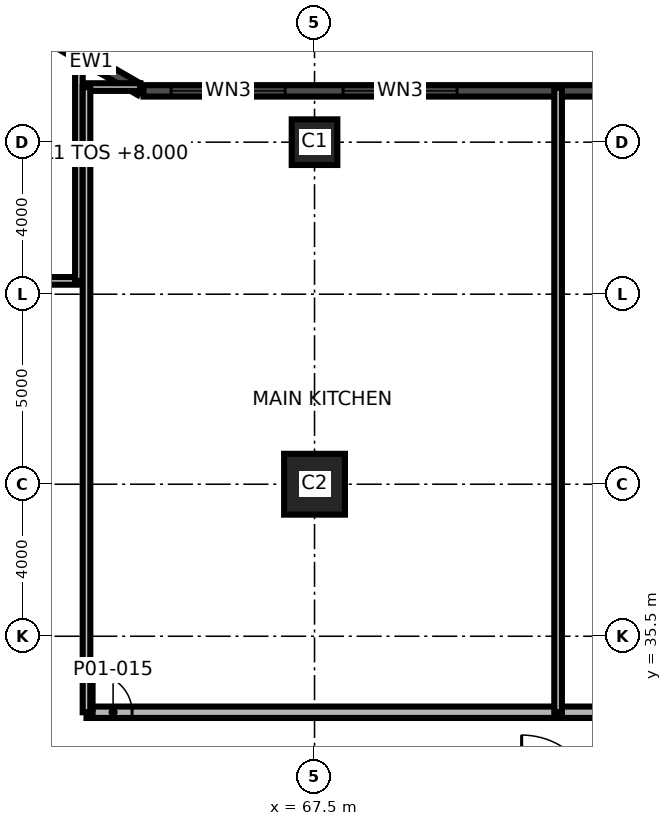
"""IFC4 building model, lengths in metres.
Left out: names, types, materials, properties, quantities, classifications, styles, units other than length and angle.
Written with IfcOpenShell. Run it as: python <this file> out.ifc"""

import sys

from ifc_helpers import new_model, si_unit, direction, frame, frame_2d, origin, origin_2d, place, context, subcontext, project, spatial, rectangle, extrude, element, fill, save


model = new_model("IFC4")
c1 = context("Model", 3, precision=1e-05, world=origin(), true_north=direction((0.0, 1.0)))
c2 = subcontext(c1, "Body", "Model", "MODEL_VIEW")
j1 = project(units=[si_unit("LENGTHUNIT", "METRE"), si_unit("PLANEANGLEUNIT", "RADIAN")], contexts=[c1])
p1 = place(None, origin())
s1 = spatial("IfcSite", under=j1, at=p1, CompositionType="ELEMENT")
p2 = place(p1, origin())
s2 = spatial("IfcBuilding", under=s1, at=p2, CompositionType="ELEMENT")
p3 = place(p2, frame((0.0, 0.0, 8.0)))
s3 = spatial("IfcBuildingStorey", under=s2, at=p3, CompositionType="ELEMENT", Elevation=8.0)
p4 = place(p3, frame((67.5, 39.5, 0.0), z_axis=(0.0, 0.0, 1.0), x_axis=(1.0, 0.0, 0.0)))
e1 = element("IfcColumn", 1, at=p4, inside=s3, PredefinedType="COLUMN", context=c2, shape_type="SweptSolid", body=[
    extrude(rectangle(XDim=1.6, YDim=1.6, at=origin_2d()), origin(), (0.0, 0.0, 1.0), 5.5),
])
p5 = place(p3, frame((67.5, 48.5, 0.0), z_axis=(0.0, 0.0, 1.0), x_axis=(1.0, 0.0, 0.0)))
e2 = element("IfcColumn", 2, at=p5, inside=s3, PredefinedType="COLUMN", context=c2, shape_type="SweptSolid", body=[
    extrude(rectangle(XDim=1.2, YDim=1.2, at=origin_2d()), origin(), (0.0, 0.0, 1.0), 5.5),
])
p6 = place(p3, frame((98.952, 49.85, 0.0), z_axis=(0.0, 0.0, 1.0), x_axis=(-1.0, 0.0, 0.0)))
e3 = element("IfcWall", 3, at=p6, inside=s3, PredefinedType="SOLIDWALL", context=c2, shape_type="SweptSolid", body=[
    extrude(rectangle(XDim=35.952, YDim=0.3, at=frame_2d((17.976, 0.0))), origin(), (0.0, 0.0, 1.0), 5.2),
])
p7 = place(p6, frame((9.702, 0.0, 0.9)))
e4 = element("IfcOpeningElement", 4, at=p7, cuts=e3, PredefinedType="OPENING", context=c2, shape_type="SweptSolid", body=[
    extrude(rectangle(XDim=3.0, YDim=2.4, at=frame_2d((1.5, 1.2))), frame((0.0, 0.16, 0.0), z_axis=(0.0, -1.0, 0.0), x_axis=(1.0, 0.0, 0.0)), (0.0, 0.0, 1.0), 0.32),
])
p8 = place(p6, frame((18.702, 0.0, 0.9)))
e5 = element("IfcOpeningElement", 5, at=p8, cuts=e3, PredefinedType="OPENING", context=c2, shape_type="SweptSolid", body=[
    extrude(rectangle(XDim=3.0, YDim=2.4, at=frame_2d((1.5, 1.2))), frame((0.0, 0.16, 0.0), z_axis=(0.0, -1.0, 0.0), x_axis=(1.0, 0.0, 0.0)), (0.0, 0.0, 1.0), 0.32),
])
p9 = place(p6, frame((27.702, 0.0, 0.9)))
e6 = element("IfcOpeningElement", 6, at=p9, cuts=e3, PredefinedType="OPENING", context=c2, shape_type="SweptSolid", body=[
    extrude(rectangle(XDim=3.0, YDim=2.4, at=frame_2d((1.5, 1.2))), frame((0.0, 0.16, 0.0), z_axis=(0.0, -1.0, 0.0), x_axis=(1.0, 0.0, 0.0)), (0.0, 0.0, 1.0), 0.32),
])
p10 = place(p6, frame((32.226, 0.0, 0.9)))
e7 = element("IfcOpeningElement", 7, at=p10, cuts=e3, PredefinedType="OPENING", context=c2, shape_type="SweptSolid", body=[
    extrude(rectangle(XDim=3.0, YDim=2.4, at=frame_2d((1.5, 1.2))), frame((0.0, 0.16, 0.0), z_axis=(0.0, -1.0, 0.0), x_axis=(1.0, 0.0, 0.0)), (0.0, 0.0, 1.0), 0.32),
])
p11 = place(p3, frame((62.925, 49.87, 0.0), z_axis=(0.0, 0.0, 1.0), x_axis=(-0.866031096941, 0.499990139034, 0.0)))
e8 = element("IfcWall", 8, at=p11, inside=s3, PredefinedType="SOLIDWALL", context=c2, shape_type="SweptSolid", body=[
    extrude(rectangle(XDim=3.0, YDim=0.3, at=frame_2d((1.5, 0.0))), origin(), (0.0, 0.0, 1.0), 5.2),
])
p12 = place(p3, frame((61.5, 33.5, 0.0), z_axis=(0.0, 0.0, 1.0), x_axis=(1.0, 0.0, 0.0)))
e9 = element("IfcWall", 9, at=p12, inside=s3, PredefinedType="SHEAR", context=c2, shape_type="SweptSolid", body=[
    extrude(rectangle(XDim=43.43, YDim=0.3, at=frame_2d((21.715, 0.0))), origin(), (0.0, 0.0, 1.0), 5.2),
])
p13 = place(p12, frame((31.95, 0.0, 0.0)))
e10 = element("IfcOpeningElement", 10, at=p13, cuts=e9, PredefinedType="OPENING", context=c2, shape_type="SweptSolid", body=[
    extrude(rectangle(XDim=1.8, YDim=2.1, at=frame_2d((0.9, 1.05))), frame((0.0, 0.16, 0.0), z_axis=(0.0, -1.0, 0.0), x_axis=(1.0, 0.0, 0.0)), (0.0, 0.0, 1.0), 0.32),
])
p14 = place(p12, frame((0.2, 0.0, 0.0)))
e11 = element("IfcOpeningElement", 11, at=p14, cuts=e9, PredefinedType="OPENING", context=c2, shape_type="SweptSolid", body=[
    extrude(rectangle(XDim=1.0, YDim=2.1, at=frame_2d((0.5, 1.05))), frame((0.0, 0.16, 0.0), z_axis=(0.0, -1.0, 0.0), x_axis=(1.0, 0.0, 0.0)), (0.0, 0.0, 1.0), 0.32),
])
p15 = place(p12, frame((16.325, 0.0, 0.0)))
e12 = element("IfcOpeningElement", 12, at=p15, cuts=e9, PredefinedType="OPENING", context=c2, shape_type="SweptSolid", body=[
    extrude(rectangle(XDim=1.0, YDim=2.1, at=frame_2d((0.5, 1.05))), frame((0.0, 0.16, 0.0), z_axis=(0.0, -1.0, 0.0), x_axis=(1.0, 0.0, 0.0)), (0.0, 0.0, 1.0), 0.32),
])
p16 = place(p12, frame((25.246, 0.0, 0.0)))
e13 = element("IfcOpeningElement", 13, at=p16, cuts=e9, PredefinedType="OPENING", context=c2, shape_type="SweptSolid", body=[
    extrude(rectangle(XDim=1.0, YDim=2.1, at=frame_2d((0.5, 1.05))), frame((0.0, 0.16, 0.0), z_axis=(0.0, -1.0, 0.0), x_axis=(1.0, 0.0, 0.0)), (0.0, 0.0, 1.0), 0.32),
])
p17 = place(p12, frame((37.945, 0.0, 0.0)))
e14 = element("IfcOpeningElement", 14, at=p17, cuts=e9, PredefinedType="OPENING", context=c2, shape_type="SweptSolid", body=[
    extrude(rectangle(XDim=1.0, YDim=2.1, at=frame_2d((0.5, 1.05))), frame((0.0, 0.16, 0.0), z_axis=(0.0, -1.0, 0.0), x_axis=(1.0, 0.0, 0.0)), (0.0, 0.0, 1.0), 0.32),
])
p18 = place(p3, frame((43.3, 44.85, 0.0), z_axis=(0.0, 0.0, 1.0), x_axis=(1.0, 0.0, 0.0)))
e15 = element("IfcWall", 15, at=p18, inside=s3, PredefinedType="PARTITIONING", context=c2, shape_type="SweptSolid", body=[
    extrude(rectangle(XDim=18.2, YDim=0.2, at=frame_2d((9.1, 0.0))), origin(), (0.0, 0.0, 1.0), 5.2),
])
p19 = place(p18, frame((3.377, 0.0, 0.0)))
e16 = element("IfcOpeningElement", 16, at=p19, cuts=e15, PredefinedType="OPENING", context=c2, shape_type="SweptSolid", body=[
    extrude(rectangle(XDim=2.2, YDim=2.4, at=frame_2d((1.1, 1.2))), frame((0.0, 0.11, 0.0), z_axis=(0.0, -1.0, 0.0), x_axis=(1.0, 0.0, 0.0)), (0.0, 0.0, 1.0), 0.22),
])
p20 = place(p3, frame((61.5, 49.95, 0.0), z_axis=(0.0, 0.0, 1.0), x_axis=(1.0, 0.0, 0.0)))
e17 = element("IfcWall", 17, at=p20, inside=s3, PredefinedType="PARTITIONING", context=c2, shape_type="SweptSolid", body=[
    extrude(rectangle(XDim=1.416, YDim=0.2, at=frame_2d((0.708, 0.0))), origin(), (0.0, 0.0, 1.0), 5.2),
])
p21 = place(p3, frame((61.3, 44.85, 0.0), z_axis=(0.0, 0.0, 1.0), x_axis=(0.0, 1.0, 0.0)))
e18 = element("IfcWall", 18, at=p21, inside=s3, PredefinedType="PARTITIONING", context=c2, shape_type="SweptSolid", body=[
    extrude(rectangle(XDim=5.742, YDim=0.2, at=frame_2d((2.871, 0.0))), origin(), (0.0, 0.0, 1.0), 5.2),
])
p22 = place(p3, frame((61.5, 33.5, 0.0), z_axis=(0.0, 0.0, 1.0), x_axis=(0.0, 1.0, 0.0)))
e19 = element("IfcWall", 19, at=p22, inside=s3, PredefinedType="PARTITIONING", context=c2, shape_type="SweptSolid", body=[
    extrude(rectangle(XDim=16.45, YDim=0.2, at=frame_2d((8.225, 0.0))), origin(), (0.0, 0.0, 1.0), 5.2),
])
p23 = place(p3, frame((73.909, 33.5, 0.0), z_axis=(0.0, 0.0, 1.0), x_axis=(0.0, 1.0, 0.0)))
e20 = element("IfcWall", 20, at=p23, inside=s3, PredefinedType="PARTITIONING", context=c2, shape_type="SweptSolid", body=[
    extrude(rectangle(XDim=16.43, YDim=0.2, at=frame_2d((8.215, 0.0))), origin(), (0.0, 0.0, 1.0), 5.2),
])
p24 = place(p9, origin())
e21 = element("IfcWindow", 21, at=p24, inside=s3, PartitioningType="SINGLE_PANEL", PredefinedType="WINDOW", context=c2, shape_type="SweptSolid", body=[
    extrude(rectangle(XDim=3.0, YDim=2.4, at=frame_2d((1.5, 1.2))), frame((0.0, 0.03, 0.0), z_axis=(0.0, -1.0, 0.0), x_axis=(1.0, 0.0, 0.0)), (0.0, 0.0, 1.0), 0.06),
])
fill(e6, e21)
p25 = place(p10, origin())
e22 = element("IfcWindow", 22, at=p25, inside=s3, PartitioningType="SINGLE_PANEL", PredefinedType="WINDOW", context=c2, shape_type="SweptSolid", body=[
    extrude(rectangle(XDim=3.0, YDim=2.4, at=frame_2d((1.5, 1.2))), frame((0.0, 0.03, 0.0), z_axis=(0.0, -1.0, 0.0), x_axis=(1.0, 0.0, 0.0)), (0.0, 0.0, 1.0), 0.06),
])
fill(e7, e22)
p26 = place(p14, origin())
e23 = element("IfcDoor", 23, at=p26, inside=s3, OperationType="SINGLE_SWING_LEFT", PredefinedType="DOOR", context=c2, shape_type="SweptSolid", body=[
    extrude(rectangle(XDim=1.0, YDim=2.1, at=frame_2d((0.5, 1.05))), frame((0.0, 0.025, 0.0), z_axis=(0.0, -1.0, 0.0), x_axis=(1.0, 0.0, 0.0)), (0.0, 0.0, 1.0), 0.05),
])
fill(e11, e23)
save(model, sys.argv[1])
